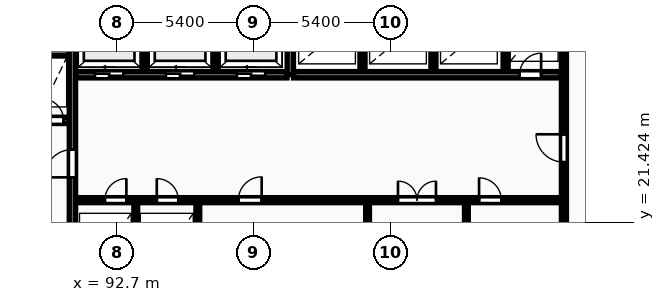
"""IFC4 building model, lengths in metres.
Left out: names, types, materials, properties, quantities, classifications, styles, units other than length and angle.
Written with IfcOpenShell. Run it as: python <this file> out.ifc"""

import sys

from ifc_helpers import new_model, si_unit, direction, frame, frame_2d, origin, place, context, subcontext, project, spatial, rectangle, extrude, element, fill, save


model = new_model("IFC4")
c1 = context("Model", 3, precision=1e-05, world=origin(), true_north=direction((0.0, 1.0)))
c2 = subcontext(c1, "Body", "Model", "MODEL_VIEW")
j1 = project(units=[si_unit("LENGTHUNIT", "METRE"), si_unit("PLANEANGLEUNIT", "RADIAN")], contexts=[c1])
p1 = place(None, origin())
s1 = spatial("IfcSite", under=j1, at=p1, CompositionType="ELEMENT")
p2 = place(p1, origin())
s2 = spatial("IfcBuilding", under=s1, at=p2, CompositionType="ELEMENT")
p3 = place(p2, frame((0.0, 0.0, 80.8)))
s3 = spatial("IfcBuildingStorey", under=s2, at=p3, CompositionType="ELEMENT", Elevation=80.8)
p4 = place(p3, frame((83.0, 28.125, 0.0), z_axis=(0.0, 0.0, 1.0), x_axis=(1.0, 0.0, 0.0)))
e1 = element("IfcWall", 1, at=p4, inside=s3, PredefinedType="SHEAR", context=c2, shape_type="SweptSolid", body=[
    extrude(rectangle(XDim=7.82, YDim=0.25, at=frame_2d((3.91, 0.0))), origin(), (0.0, 0.0, 1.0), 3.25),
])
p5 = place(p3, frame((86.5, 25.45, 0.0), z_axis=(0.0, 0.0, 1.0), x_axis=(1.0, 0.0, 0.0)))
e2 = element("IfcWall", 2, at=p5, inside=s3, PredefinedType="SHEAR", context=c2, shape_type="SweptSolid", body=[
    extrude(rectangle(XDim=4.32, YDim=0.25, at=frame_2d((2.16, 0.0))), origin(), (0.0, 0.0, 1.0), 3.25),
])
p6 = place(p5, frame((1.14, 0.0, 0.0)))
e3 = element("IfcOpeningElement", 3, at=p6, cuts=e2, PredefinedType="OPENING", context=c2, shape_type="SweptSolid", body=[
    extrude(rectangle(XDim=1.12, YDim=2.12, at=frame_2d((0.56, 1.06))), frame((0.0, 0.135, 0.0), z_axis=(0.0, -1.0, 0.0), x_axis=(1.0, 0.0, 0.0)), (0.0, 0.0, 1.0), 0.27),
])
p7 = place(p5, frame((3.25, 0.0, 0.0)))
e4 = element("IfcOpeningElement", 4, at=p7, cuts=e2, PredefinedType="OPENING", context=c2, shape_type="SweptSolid", body=[
    extrude(rectangle(XDim=0.85, YDim=2.05, at=frame_2d((0.425, 1.025))), frame((0.0, 0.135, 0.0), z_axis=(0.0, -1.0, 0.0), x_axis=(1.0, 0.0, 0.0)), (0.0, 0.0, 1.0), 0.27),
])
p8 = place(p3, frame((90.95, 18.6, 0.0), z_axis=(0.0, 0.0, 1.0), x_axis=(0.0, 1.0, 0.0)))
e5 = element("IfcWall", 5, at=p8, inside=s3, PredefinedType="SHEAR", context=c2, shape_type="SweptSolid", body=[
    extrude(rectangle(XDim=11.6, YDim=0.25, at=frame_2d((5.8, 0.0))), origin(), (0.0, 0.0, 1.0), 3.25),
])
p9 = place(p8, frame((4.6, 0.0, 0.0)))
e6 = element("IfcOpeningElement", 6, at=p9, cuts=e5, PredefinedType="OPENING", context=c2, shape_type="SweptSolid", body=[
    extrude(rectangle(XDim=1.1, YDim=2.1, at=frame_2d((0.55, 1.05))), frame((0.0, 0.135, 0.0), z_axis=(0.0, -1.0, 0.0), x_axis=(1.0, 0.0, 0.0)), (0.0, 0.0, 1.0), 0.27),
])
for number, where, z_axis, x_axis in (
    (7, (93.8, 27.38, 0.0), (0.0, 0.0, 1.0), (0.0, 1.0, 0.0)),
    (8, (96.6, 27.38, 0.0), (0.0, 0.0, 1.0), (0.0, 1.0, 0.0)),
):
    element("IfcWall", number, at=place(p3, frame(where, z_axis=z_axis, x_axis=x_axis)), inside=s3, PredefinedType="PARTITIONING", context=c2, shape_type="SweptSolid", body=[
        extrude(rectangle(XDim=2.82, YDim=0.2, at=frame_2d((1.41, 0.0))), origin(), (0.0, 0.0, 1.0), 2.97),
    ])
p10 = place(p3, frame((91.08, 27.25, 0.0), z_axis=(0.0, 0.0, 1.0), x_axis=(1.0, 0.0, 0.0)))
e9 = element("IfcWall", 9, at=p10, inside=s3, PredefinedType="SHEAR", context=c2, shape_type="SweptSolid", body=[
    extrude(rectangle(XDim=8.34, YDim=0.25, at=frame_2d((4.17, 0.0))), origin(), (0.0, 0.0, 1.0), 3.25),
])
p11 = place(p10, frame((0.76, 0.0, 0.0)))
e10 = element("IfcOpeningElement", 10, at=p11, cuts=e9, PredefinedType="OPENING", context=c2, shape_type="SweptSolid", body=[
    extrude(rectangle(XDim=1.12, YDim=2.12, at=frame_2d((0.56, 1.06))), frame((0.0, 0.135, 0.0), z_axis=(0.0, -1.0, 0.0), x_axis=(1.0, 0.0, 0.0)), (0.0, 0.0, 1.0), 0.27),
])
p12 = place(p10, frame((3.56, 0.0, 0.0)))
e11 = element("IfcOpeningElement", 11, at=p12, cuts=e9, PredefinedType="OPENING", context=c2, shape_type="SweptSolid", body=[
    extrude(rectangle(XDim=1.12, YDim=2.12, at=frame_2d((0.56, 1.06))), frame((0.0, 0.135, 0.0), z_axis=(0.0, -1.0, 0.0), x_axis=(1.0, 0.0, 0.0)), (0.0, 0.0, 1.0), 0.27),
])
p13 = place(p10, frame((6.36, 0.0, 0.0)))
e12 = element("IfcOpeningElement", 12, at=p13, cuts=e9, PredefinedType="OPENING", context=c2, shape_type="SweptSolid", body=[
    extrude(rectangle(XDim=1.12, YDim=2.12, at=frame_2d((0.56, 1.06))), frame((0.0, 0.135, 0.0), z_axis=(0.0, -1.0, 0.0), x_axis=(1.0, 0.0, 0.0)), (0.0, 0.0, 1.0), 0.27),
])
p14 = place(p3, frame((99.55, 27.25, 0.0), z_axis=(0.0, 0.0, 1.0), x_axis=(0.0, 1.0, 0.0)))
e13 = element("IfcWall", 13, at=p14, inside=s3, PredefinedType="SHEAR", context=c2, shape_type="SweptSolid", body=[
    extrude(rectangle(XDim=2.95, YDim=0.25, at=frame_2d((1.475, 0.0))), origin(), (0.0, 0.0, 1.0), 3.25),
])
for number, where, z_axis, x_axis in (
    (14, (102.4, 27.38, 0.0), (0.0, 0.0, 1.0), (0.0, 1.0, 0.0)),
    (15, (105.2, 27.38, 0.0), (0.0, 0.0, 1.0), (0.0, 1.0, 0.0)),
    (16, (108.05, 27.38, 0.0), (0.0, 0.0, 1.0), (0.0, 1.0, 0.0)),
):
    element("IfcWall", number, at=place(p3, frame(where, z_axis=z_axis, x_axis=x_axis)), inside=s3, PredefinedType="PARTITIONING", context=c2, shape_type="SweptSolid", body=[
        extrude(rectangle(XDim=2.82, YDim=0.2, at=frame_2d((1.41, 0.0))), origin(), (0.0, 0.0, 1.0), 2.97),
    ])
p15 = place(p3, frame((99.68, 27.25, 0.0), z_axis=(0.0, 0.0, 1.0), x_axis=(1.0, 0.0, 0.0)))
e17 = element("IfcWall", 17, at=p15, inside=s3, PredefinedType="SHEAR", context=c2, shape_type="SweptSolid", body=[
    extrude(rectangle(XDim=10.54, YDim=0.25, at=frame_2d((5.27, 0.0))), origin(), (0.0, 0.0, 1.0), 3.25),
])
p16 = place(p15, frame((8.92, 0.0, 0.0)))
e18 = element("IfcOpeningElement", 18, at=p16, cuts=e17, PredefinedType="OPENING", context=c2, shape_type="SweptSolid", body=[
    extrude(rectangle(XDim=0.85, YDim=2.05, at=frame_2d((0.425, 1.025))), frame((0.0, 0.135, 0.0), z_axis=(0.0, -1.0, 0.0), x_axis=(1.0, 0.0, 0.0)), (0.0, 0.0, 1.0), 0.27),
])
for number, where, z_axis, x_axis in (
    (19, (93.45, 18.6, 0.0), (0.0, 0.0, 1.0), (0.0, 1.0, 0.0)),
    (20, (95.9, 18.6, 0.0), (0.0, 0.0, 1.0), (0.0, 1.0, 0.0)),
    (21, (102.6, 18.6, 0.0), (0.0, 0.0, 1.0), (0.0, 1.0, 0.0)),
    (22, (106.5, 18.6, 0.0), (0.0, 0.0, 1.0), (0.0, 1.0, 0.0)),
):
    element("IfcWall", number, at=place(p3, frame(where, z_axis=z_axis, x_axis=x_axis)), inside=s3, PredefinedType="PARTITIONING", context=c2, shape_type="SweptSolid", body=[
        extrude(rectangle(XDim=3.6, YDim=0.15, at=frame_2d((1.8, 0.0))), origin(), (0.0, 0.0, 1.0), 2.97),
    ])
p17 = place(p3, frame((91.08, 22.3, 0.0), z_axis=(0.0, 0.0, 1.0), x_axis=(1.0, 0.0, 0.0)))
e23 = element("IfcWall", 23, at=p17, inside=s3, PredefinedType="PARTITIONING", context=c2, shape_type="SweptSolid", body=[
    extrude(rectangle(XDim=19.14, YDim=0.2, at=frame_2d((9.57, 0.0))), origin(), (0.0, 0.0, 1.0), 2.97),
])
p18 = place(p17, frame((1.15, 0.0, 0.0)))
e24 = element("IfcOpeningElement", 24, at=p18, cuts=e23, PredefinedType="OPENING", context=c2, shape_type="SweptSolid", body=[
    extrude(rectangle(XDim=0.85, YDim=2.05, at=frame_2d((0.425, 1.025))), frame((0.0, 0.11, 0.0), z_axis=(0.0, -1.0, 0.0), x_axis=(1.0, 0.0, 0.0)), (0.0, 0.0, 1.0), 0.22),
])
p19 = place(p17, frame((3.2, 0.0, 0.0)))
e25 = element("IfcOpeningElement", 25, at=p19, cuts=e23, PredefinedType="OPENING", context=c2, shape_type="SweptSolid", body=[
    extrude(rectangle(XDim=0.85, YDim=2.05, at=frame_2d((0.425, 1.025))), frame((0.0, 0.11, 0.0), z_axis=(0.0, -1.0, 0.0), x_axis=(1.0, 0.0, 0.0)), (0.0, 0.0, 1.0), 0.22),
])
p20 = place(p17, frame((12.72, 0.0, 0.0)))
e26 = element("IfcOpeningElement", 26, at=p20, cuts=e23, PredefinedType="OPENING", context=c2, shape_type="SweptSolid", body=[
    extrude(rectangle(XDim=1.5, YDim=2.2, at=frame_2d((0.75, 1.1))), frame((0.0, 0.11, 0.0), z_axis=(0.0, -1.0, 0.0), x_axis=(1.0, 0.0, 0.0)), (0.0, 0.0, 1.0), 0.22),
])
p21 = place(p17, frame((6.42, 0.0, 0.0)))
e27 = element("IfcOpeningElement", 27, at=p21, cuts=e23, PredefinedType="OPENING", context=c2, shape_type="SweptSolid", body=[
    extrude(rectangle(XDim=0.92, YDim=2.08, at=frame_2d((0.46, 1.04))), frame((0.0, 0.11, 0.0), z_axis=(0.0, -1.0, 0.0), x_axis=(1.0, 0.0, 0.0)), (0.0, 0.0, 1.0), 0.22),
])
p22 = place(p17, frame((15.92, 0.0, 0.0)))
e28 = element("IfcOpeningElement", 28, at=p22, cuts=e23, PredefinedType="OPENING", context=c2, shape_type="SweptSolid", body=[
    extrude(rectangle(XDim=0.88, YDim=2.06, at=frame_2d((0.44, 1.03))), frame((0.0, 0.11, 0.0), z_axis=(0.0, -1.0, 0.0), x_axis=(1.0, 0.0, 0.0)), (0.0, 0.0, 1.0), 0.22),
])
p23 = place(p3, frame((110.35, 18.6, 0.0), z_axis=(0.0, 0.0, 1.0), x_axis=(0.0, 1.0, 0.0)))
e29 = element("IfcWall", 29, at=p23, inside=s3, PredefinedType="PARTITIONING", context=c2, shape_type="SweptSolid", body=[
    extrude(rectangle(XDim=11.6, YDim=0.2, at=frame_2d((5.8, 0.0))), origin(), (0.0, 0.0, 1.0), 2.97),
])
p24 = place(p23, frame((5.2, 0.0, 0.0)))
e30 = element("IfcOpeningElement", 30, at=p24, cuts=e29, PredefinedType="OPENING", context=c2, shape_type="SweptSolid", body=[
    extrude(rectangle(XDim=1.1, YDim=2.15, at=frame_2d((0.55, 1.075))), frame((0.0, 0.11, 0.0), z_axis=(0.0, -1.0, 0.0), x_axis=(1.0, 0.0, 0.0)), (0.0, 0.0, 1.0), 0.22),
])
p25 = place(p7, origin())
e31 = element("IfcDoor", 31, at=p25, inside=s3, OperationType="SINGLE_SWING_LEFT", PredefinedType="DOOR", context=c2, shape_type="SweptSolid", body=[
    extrude(rectangle(XDim=0.85, YDim=2.05, at=frame_2d((0.425, 1.025))), frame((0.0, 0.025, 0.0), z_axis=(0.0, -1.0, 0.0), x_axis=(1.0, 0.0, 0.0)), (0.0, 0.0, 1.0), 0.05),
])
fill(e4, e31)
p26 = place(p9, origin())
e32 = element("IfcDoor", 32, at=p26, inside=s3, OperationType="SINGLE_SWING_LEFT", PredefinedType="DOOR", context=c2, shape_type="SweptSolid", body=[
    extrude(rectangle(XDim=1.1, YDim=2.1, at=frame_2d((0.55, 1.05))), frame((0.0, 0.025, 0.0), z_axis=(0.0, -1.0, 0.0), x_axis=(1.0, 0.0, 0.0)), (0.0, 0.0, 1.0), 0.05),
])
fill(e6, e32)
p27 = place(p11, origin())
e33 = element("IfcDoor", 33, at=p27, inside=s3, OperationType="SLIDING_TO_LEFT", PredefinedType="DOOR", context=c2, shape_type="SweptSolid", body=[
    extrude(rectangle(XDim=1.12, YDim=2.12, at=frame_2d((0.56, 1.06))), frame((0.0, 0.025, 0.0), z_axis=(0.0, -1.0, 0.0), x_axis=(1.0, 0.0, 0.0)), (0.0, 0.0, 1.0), 0.05),
])
fill(e10, e33)
p28 = place(p12, origin())
e34 = element("IfcDoor", 34, at=p28, inside=s3, OperationType="SLIDING_TO_LEFT", PredefinedType="DOOR", context=c2, shape_type="SweptSolid", body=[
    extrude(rectangle(XDim=1.12, YDim=2.12, at=frame_2d((0.56, 1.06))), frame((0.0, 0.025, 0.0), z_axis=(0.0, -1.0, 0.0), x_axis=(1.0, 0.0, 0.0)), (0.0, 0.0, 1.0), 0.05),
])
fill(e11, e34)
p29 = place(p13, origin())
e35 = element("IfcDoor", 35, at=p29, inside=s3, OperationType="SLIDING_TO_LEFT", PredefinedType="DOOR", context=c2, shape_type="SweptSolid", body=[
    extrude(rectangle(XDim=1.12, YDim=2.12, at=frame_2d((0.56, 1.06))), frame((0.0, 0.025, 0.0), z_axis=(0.0, -1.0, 0.0), x_axis=(1.0, 0.0, 0.0)), (0.0, 0.0, 1.0), 0.05),
])
fill(e12, e35)
p30 = place(p16, origin())
e36 = element("IfcDoor", 36, at=p30, inside=s3, OperationType="SINGLE_SWING_RIGHT", PredefinedType="DOOR", context=c2, shape_type="SweptSolid", body=[
    extrude(rectangle(XDim=0.85, YDim=2.05, at=frame_2d((0.425, 1.025))), frame((0.0, 0.025, 0.0), z_axis=(0.0, -1.0, 0.0), x_axis=(1.0, 0.0, 0.0)), (0.0, 0.0, 1.0), 0.05),
])
fill(e18, e36)
p31 = place(p18, origin())
e37 = element("IfcDoor", 37, at=p31, inside=s3, OperationType="SINGLE_SWING_RIGHT", PredefinedType="DOOR", context=c2, shape_type="SweptSolid", body=[
    extrude(rectangle(XDim=0.85, YDim=2.05, at=frame_2d((0.425, 1.025))), frame((0.0, 0.025, 0.0), z_axis=(0.0, -1.0, 0.0), x_axis=(1.0, 0.0, 0.0)), (0.0, 0.0, 1.0), 0.05),
])
fill(e24, e37)
p32 = place(p19, origin())
e38 = element("IfcDoor", 38, at=p32, inside=s3, OperationType="SINGLE_SWING_LEFT", PredefinedType="DOOR", context=c2, shape_type="SweptSolid", body=[
    extrude(rectangle(XDim=0.85, YDim=2.05, at=frame_2d((0.425, 1.025))), frame((0.0, 0.025, 0.0), z_axis=(0.0, -1.0, 0.0), x_axis=(1.0, 0.0, 0.0)), (0.0, 0.0, 1.0), 0.05),
])
fill(e25, e38)
p33 = place(p20, origin())
e39 = element("IfcDoor", 39, at=p33, inside=s3, OperationType="DOUBLE_DOOR_SINGLE_SWING", PredefinedType="DOOR", context=c2, shape_type="SweptSolid", body=[
    extrude(rectangle(XDim=1.5, YDim=2.2, at=frame_2d((0.75, 1.1))), frame((0.0, 0.025, 0.0), z_axis=(0.0, -1.0, 0.0), x_axis=(1.0, 0.0, 0.0)), (0.0, 0.0, 1.0), 0.05),
])
fill(e26, e39)
p34 = place(p21, origin())
e40 = element("IfcDoor", 40, at=p34, inside=s3, OperationType="SINGLE_SWING_RIGHT", PredefinedType="DOOR", context=c2, shape_type="SweptSolid", body=[
    extrude(rectangle(XDim=0.92, YDim=2.08, at=frame_2d((0.46, 1.04))), frame((0.0, 0.025, 0.0), z_axis=(0.0, -1.0, 0.0), x_axis=(1.0, 0.0, 0.0)), (0.0, 0.0, 1.0), 0.05),
])
fill(e27, e40)
p35 = place(p22, origin())
e41 = element("IfcDoor", 41, at=p35, inside=s3, OperationType="SINGLE_SWING_LEFT", PredefinedType="DOOR", context=c2, shape_type="SweptSolid", body=[
    extrude(rectangle(XDim=0.88, YDim=2.06, at=frame_2d((0.44, 1.03))), frame((0.0, 0.025, 0.0), z_axis=(0.0, -1.0, 0.0), x_axis=(1.0, 0.0, 0.0)), (0.0, 0.0, 1.0), 0.05),
])
fill(e28, e41)
p36 = place(p24, origin())
e42 = element("IfcDoor", 42, at=p36, inside=s3, OperationType="SINGLE_SWING_RIGHT", PredefinedType="DOOR", context=c2, shape_type="SweptSolid", body=[
    extrude(rectangle(XDim=1.1, YDim=2.15, at=frame_2d((0.55, 1.075))), frame((0.0, 0.025, 0.0), z_axis=(0.0, -1.0, 0.0), x_axis=(1.0, 0.0, 0.0)), (0.0, 0.0, 1.0), 0.05),
])
fill(e30, e42)
save(model, sys.argv[1])
